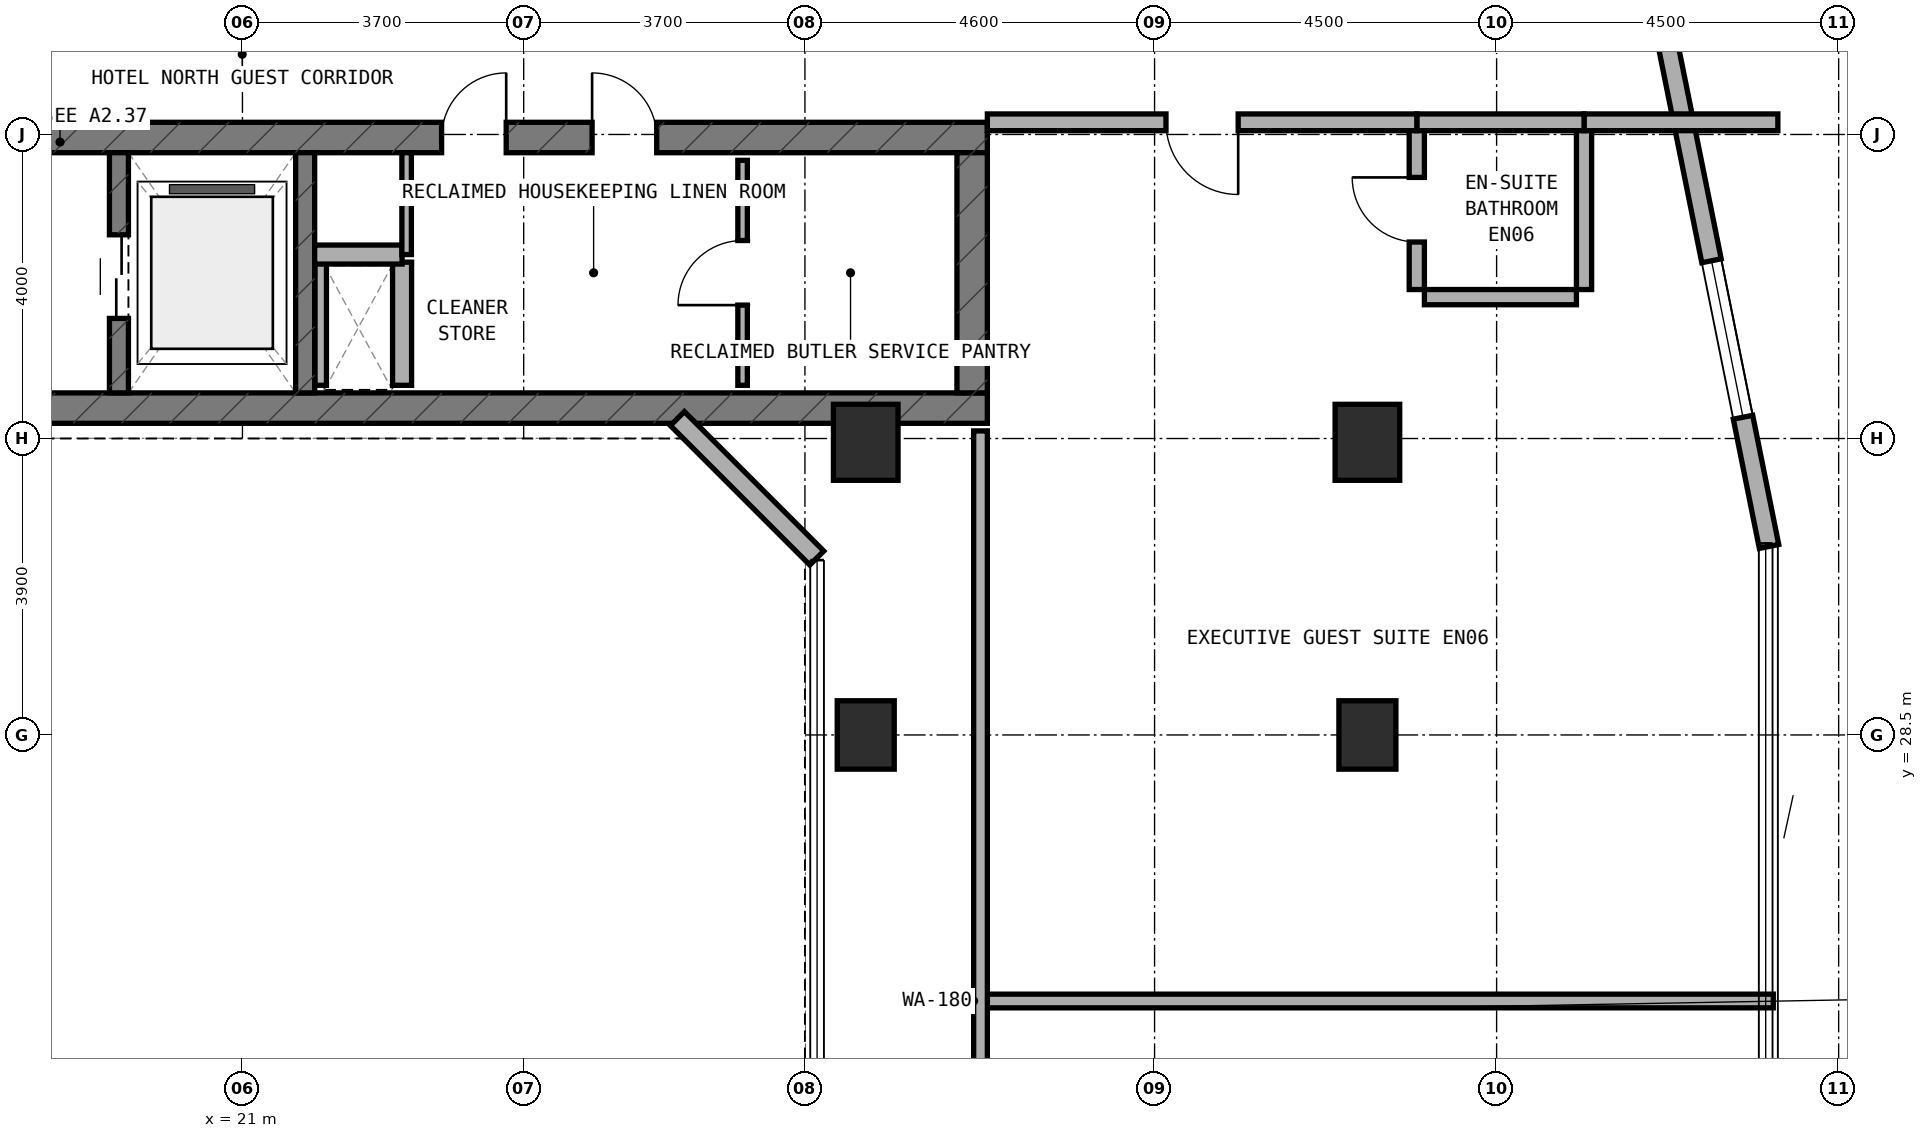
"""IFC4 building model, lengths in metres.
Left out: names, types, materials, properties, quantities, classifications, styles, units other than length and angle.
Written with IfcOpenShell. Run it as: python <this file> out.ifc"""

import sys

from ifc_helpers import new_model, si_unit, direction, frame, frame_2d, origin, origin_2d, place, context, subcontext, project, spatial, rectangle, extrude, element, fill, save


model = new_model("IFC4")
c1 = context("Model", 3, precision=1e-05, world=origin(), true_north=direction((0.0, 1.0)))
c2 = subcontext(c1, "Body", "Model", "MODEL_VIEW")
j1 = project(units=[si_unit("LENGTHUNIT", "METRE"), si_unit("PLANEANGLEUNIT", "RADIAN")], contexts=[c1])
p1 = place(None, origin())
s1 = spatial("IfcSite", under=j1, at=p1, CompositionType="ELEMENT")
p2 = place(p1, origin())
s2 = spatial("IfcBuilding", under=s1, at=p2, CompositionType="ELEMENT")
p3 = place(p2, frame((0.0, 0.0, 166.0)))
s3 = spatial("IfcBuildingStorey", under=s2, at=p3, CompositionType="ELEMENT", Elevation=166.0)
p4 = place(p3, frame((6.4, 32.8, 0.0), z_axis=(0.0, 0.0, 1.0), x_axis=(1.0, 0.0, 0.0)))
e1 = element("IfcWall", 1, at=p4, inside=s3, PredefinedType="SHEAR", context=c2, shape_type="SweptSolid", body=[
    extrude(rectangle(XDim=24.4, YDim=0.4, at=frame_2d((12.2, 0.0))), origin(), (0.0, 0.0, 1.0), 3.5),
])
p5 = place(p4, frame((6.05, 0.0, 0.0)))
e2 = element("IfcOpeningElement", 2, at=p5, cuts=e1, PredefinedType="OPENING", context=c2, shape_type="SweptSolid", body=[
    extrude(rectangle(XDim=1.1, YDim=2.15, at=frame_2d((0.55, 1.075))), frame((0.0, 0.21, 0.0), z_axis=(0.0, -1.0, 0.0), x_axis=(1.0, 0.0, 0.0)), (0.0, 0.0, 1.0), 0.42),
])
p6 = place(p3, frame((6.4, 36.36, 0.0), z_axis=(0.0, 0.0, 1.0), x_axis=(1.0, 0.0, 0.0)))
e3 = element("IfcWall", 3, at=p6, inside=s3, PredefinedType="SHEAR", context=c2, shape_type="SweptSolid", body=[
    extrude(rectangle(XDim=24.4, YDim=0.4, at=frame_2d((12.2, 0.0))), origin(), (0.0, 0.0, 1.0), 3.5),
])
p7 = place(p6, frame((9.15, 0.0, 0.0)))
e4 = element("IfcOpeningElement", 4, at=p7, cuts=e3, PredefinedType="OPENING", context=c2, shape_type="SweptSolid", body=[
    extrude(rectangle(XDim=1.2, YDim=2.15, at=frame_2d((0.6, 1.075))), frame((0.0, 0.21, 0.0), z_axis=(0.0, -1.0, 0.0), x_axis=(1.0, 0.0, 0.0)), (0.0, 0.0, 1.0), 0.42),
])
p8 = place(p6, frame((19.2, 0.0, 0.0)))
e5 = element("IfcOpeningElement", 5, at=p8, cuts=e3, PredefinedType="OPENING", context=c2, shape_type="SweptSolid", body=[
    extrude(rectangle(XDim=0.85, YDim=2.1, at=frame_2d((0.425, 1.05))), frame((0.0, 0.21, 0.0), z_axis=(0.0, -1.0, 0.0), x_axis=(1.0, 0.0, 0.0)), (0.0, 0.0, 1.0), 0.42),
])
p9 = place(p6, frame((17.22, 0.0, 0.0)))
e6 = element("IfcOpeningElement", 6, at=p9, cuts=e3, PredefinedType="OPENING", context=c2, shape_type="SweptSolid", body=[
    extrude(rectangle(XDim=0.85, YDim=2.1, at=frame_2d((0.425, 1.05))), frame((0.0, 0.21, 0.0), z_axis=(0.0, -1.0, 0.0), x_axis=(1.0, 0.0, 0.0)), (0.0, 0.0, 1.0), 0.42),
])
p10 = place(p3, frame((30.6, 33.0, 0.0), z_axis=(0.0, 0.0, 1.0), x_axis=(0.0, 1.0, 0.0)))
e7 = element("IfcWall", 7, at=p10, inside=s3, PredefinedType="SHEAR", context=c2, shape_type="SweptSolid", body=[
    extrude(rectangle(XDim=3.16, YDim=0.4, at=frame_2d((1.58, 0.0))), origin(), (0.0, 0.0, 1.0), 3.5),
])
p11 = place(p3, frame((19.375, 33.0, 0.0), z_axis=(0.0, 0.0, 1.0), x_axis=(0.0, 1.0, 0.0)))
e8 = element("IfcWall", 8, at=p11, inside=s3, PredefinedType="STANDARD", context=c2, shape_type="SweptSolid", body=[
    extrude(rectangle(XDim=3.16, YDim=0.25, at=frame_2d((1.58, 0.0))), origin(), (0.0, 0.0, 1.0), 3.22),
])
p12 = place(p11, frame((0.98, 0.0, 0.0)))
e9 = element("IfcOpeningElement", 9, at=p12, cuts=e8, PredefinedType="OPENING", context=c2, shape_type="SweptSolid", body=[
    extrude(rectangle(XDim=1.1, YDim=2.15, at=frame_2d((0.55, 1.075))), frame((0.0, 0.135, 0.0), z_axis=(0.0, -1.0, 0.0), x_axis=(1.0, 0.0, 0.0)), (0.0, 0.0, 1.0), 0.27),
])
p13 = place(p3, frame((21.825, 33.0, 0.0), z_axis=(0.0, 0.0, 1.0), x_axis=(0.0, 1.0, 0.0)))
e10 = element("IfcWall", 10, at=p13, inside=s3, PredefinedType="STANDARD", context=c2, shape_type="SweptSolid", body=[
    extrude(rectangle(XDim=3.16, YDim=0.25, at=frame_2d((1.58, 0.0))), origin(), (0.0, 0.0, 1.0), 3.22),
])
p14 = place(p3, frame((35.8, 28.5, 0.0), z_axis=(0.0, 0.0, 1.0), x_axis=(1.0, 0.0, 0.0)))
e11 = element("IfcColumn", 11, at=p14, inside=s3, PredefinedType="COLUMN", context=c2, shape_type="SweptSolid", body=[
    extrude(rectangle(XDim=0.75, YDim=0.9, at=origin_2d()), origin(), (0.0, 0.0, 1.0), 3.5),
])
for number, where, z_axis, x_axis in (
    (12, (35.8, 32.35, 0.0), (0.0, 0.0, 1.0), (1.0, 0.0, 0.0)),
    (13, (29.2, 32.35, 0.0), (0.0, 0.0, 1.0), (1.0, 0.0, 0.0)),
):
    element("IfcColumn", number, at=place(p3, frame(where, z_axis=z_axis, x_axis=x_axis)), inside=s3, PredefinedType="COLUMN", context=c2, shape_type="SweptSolid", body=[
        extrude(rectangle(XDim=0.85, YDim=1.0, at=origin_2d()), origin(), (0.0, 0.0, 1.0), 3.5),
    ])
p15 = place(p3, frame((29.2, 28.5, 0.0), z_axis=(0.0, 0.0, 1.0), x_axis=(1.0, 0.0, 0.0)))
e14 = element("IfcColumn", 14, at=p15, inside=s3, PredefinedType="COLUMN", context=c2, shape_type="SweptSolid", body=[
    extrude(rectangle(XDim=0.75, YDim=0.9, at=origin_2d()), origin(), (0.0, 0.0, 1.0), 3.5),
])
p16 = place(p3, frame((41.084, 30.98, 0.0), z_axis=(0.0, 0.0, 1.0), x_axis=(-0.197435082048, 0.980315963543, 0.0)))
e15 = element("IfcWall", 15, at=p16, inside=s3, PredefinedType="STANDARD", context=c2, shape_type="SweptSolid", body=[
    extrude(rectangle(XDim=9.183, YDim=0.26, at=frame_2d((4.591, 0.0))), origin(), (0.0, 0.0, 1.0), 3.22),
])
p17 = place(p16, frame((1.734, 0.0, 0.85)))
e16 = element("IfcOpeningElement", 16, at=p17, cuts=e15, PredefinedType="OPENING", context=c2, shape_type="SweptSolid", body=[
    extrude(rectangle(XDim=2.1, YDim=1.5, at=frame_2d((1.05, 0.75))), frame((0.0, 0.14, 0.0), z_axis=(0.0, -1.0, 0.0), x_axis=(1.0, 0.0, 0.0)), (0.0, 0.0, 1.0), 0.28),
])
p18 = place(p3, frame((28.556, 30.828, 0.0), z_axis=(0.0, 0.0, 1.0), x_axis=(-0.707059717605, 0.707153841636, 0.0)))
e17 = element("IfcWall", 17, at=p18, inside=s3, PredefinedType="STANDARD", context=c2, shape_type="SweptSolid", body=[
    extrude(rectangle(XDim=2.594, YDim=0.26, at=frame_2d((1.297, 0.0))), origin(), (0.0, 0.0, 1.0), 3.22),
])
p19 = place(p3, frame((27.58, 33.1, 0.0), z_axis=(0.0, 0.0, 1.0), x_axis=(0.0, 1.0, 0.0)))
e18 = element("IfcWall", 18, at=p19, inside=s3, PredefinedType="PARTITIONING", context=c2, shape_type="SweptSolid", body=[
    extrude(rectangle(XDim=2.96, YDim=0.125, at=frame_2d((1.48, 0.0))), origin(), (0.0, 0.0, 1.0), 2.795),
])
p20 = place(p19, frame((1.055, 0.0, 0.0)))
e19 = element("IfcOpeningElement", 19, at=p20, cuts=e18, PredefinedType="OPENING", context=c2, shape_type="SweptSolid", body=[
    extrude(rectangle(XDim=0.85, YDim=2.1, at=frame_2d((0.425, 1.05))), frame((0.0, 0.073, 0.0), z_axis=(0.0, -1.0, 0.0), x_axis=(1.0, 0.0, 0.0)), (0.0, 0.0, 1.0), 0.145),
])
p21 = place(p3, frame((22.03, 33.1, 0.0), z_axis=(0.0, 0.0, 1.0), x_axis=(0.0, 1.0, 0.0)))
e20 = element("IfcWall", 20, at=p21, inside=s3, PredefinedType="PARTITIONING", context=c2, shape_type="SweptSolid", body=[
    extrude(rectangle(XDim=1.62, YDim=0.15, at=frame_2d((0.81, 0.0))), origin(), (0.0, 0.0, 1.0), 3.22),
])
p22 = place(p3, frame((23.1, 33.1, 0.0), z_axis=(0.0, 0.0, 1.0), x_axis=(0.0, 1.0, 0.0)))
e21 = element("IfcWall", 21, at=p22, inside=s3, PredefinedType="SOLIDWALL", context=c2, shape_type="SweptSolid", body=[
    extrude(rectangle(XDim=1.62, YDim=0.25, at=frame_2d((0.81, 0.0))), origin(), (0.0, 0.0, 1.0), 3.22),
])
p23 = place(p3, frame((21.95, 34.82, 0.0), z_axis=(0.0, 0.0, 1.0), x_axis=(1.0, 0.0, 0.0)))
e22 = element("IfcWall", 22, at=p23, inside=s3, PredefinedType="SOLIDWALL", context=c2, shape_type="SweptSolid", body=[
    extrude(rectangle(XDim=1.15, YDim=0.25, at=frame_2d((0.575, 0.0))), origin(), (0.0, 0.0, 1.0), 3.22),
])
p24 = place(p3, frame((23.16, 34.82, 0.0), z_axis=(0.0, 0.0, 1.0), x_axis=(0.0, 1.0, 0.0)))
e23 = element("IfcWall", 23, at=p24, inside=s3, PredefinedType="PARTITIONING", context=c2, shape_type="SweptSolid", body=[
    extrude(rectangle(XDim=1.34, YDim=0.125, at=frame_2d((0.67, 0.0))), origin(), (0.0, 0.0, 1.0), 3.22),
])
p25 = place(p3, frame((30.8, 25.0, 0.0), z_axis=(0.0, 0.0, 1.0), x_axis=(1.0, 0.0, 0.0)))
e24 = element("IfcWall", 24, at=p25, inside=s3, PredefinedType="SOLIDWALL", context=c2, shape_type="SweptSolid", body=[
    extrude(rectangle(XDim=10.34, YDim=0.18, at=frame_2d((5.17, 0.0))), origin(), (0.0, 0.0, 1.0), 2.835),
])
p26 = place(p3, frame((30.71, 17.5, 0.0), z_axis=(0.0, 0.0, 1.0), x_axis=(0.0, 1.0, 0.0)))
e25 = element("IfcWall", 25, at=p26, inside=s3, PredefinedType="SOLIDWALL", context=c2, shape_type="SweptSolid", body=[
    extrude(rectangle(XDim=15.0, YDim=0.18, at=frame_2d((7.5, 0.0))), origin(), (0.0, 0.0, 1.0), 2.795),
])
p27 = place(p3, frame((36.45, 34.36, 0.0), z_axis=(0.0, 0.0, 1.0), x_axis=(0.0, 1.0, 0.0)))
e26 = element("IfcWall", 26, at=p27, inside=s3, PredefinedType="PLUMBINGWALL", context=c2, shape_type="SweptSolid", body=[
    extrude(rectangle(XDim=2.1, YDim=0.2, at=frame_2d((1.05, 0.0))), origin(), (0.0, 0.0, 1.0), 3.22),
])
p28 = place(p27, frame((0.625, 0.0, 0.0)))
e27 = element("IfcOpeningElement", 27, at=p28, cuts=e26, PredefinedType="OPENING", context=c2, shape_type="SweptSolid", body=[
    extrude(rectangle(XDim=0.85, YDim=2.1, at=frame_2d((0.425, 1.05))), frame((0.0, 0.11, 0.0), z_axis=(0.0, -1.0, 0.0), x_axis=(1.0, 0.0, 0.0)), (0.0, 0.0, 1.0), 0.22),
])
p29 = place(p3, frame((36.55, 34.26, 0.0), z_axis=(0.0, 0.0, 1.0), x_axis=(1.0, 0.0, 0.0)))
e28 = element("IfcWall", 28, at=p29, inside=s3, PredefinedType="PLUMBINGWALL", context=c2, shape_type="SweptSolid", body=[
    extrude(rectangle(XDim=2.0, YDim=0.2, at=frame_2d((1.0, 0.0))), origin(), (0.0, 0.0, 1.0), 3.22),
])
p30 = place(p3, frame((38.65, 34.36, 0.0), z_axis=(0.0, 0.0, 1.0), x_axis=(0.0, 1.0, 0.0)))
e29 = element("IfcWall", 29, at=p30, inside=s3, PredefinedType="PLUMBINGWALL", context=c2, shape_type="SweptSolid", body=[
    extrude(rectangle(XDim=2.1, YDim=0.2, at=frame_2d((1.05, 0.0))), origin(), (0.0, 0.0, 1.0), 3.22),
])
p31 = place(p3, frame((38.65, 36.56, 0.0), z_axis=(0.0, 0.0, 1.0), x_axis=(1.0, 0.0, 0.0)))
e30 = element("IfcWall", 30, at=p31, inside=s3, PredefinedType="SOLIDWALL", context=c2, shape_type="SweptSolid", body=[
    extrude(rectangle(XDim=2.55, YDim=0.22, at=frame_2d((1.275, 0.0))), origin(), (0.0, 0.0, 1.0), 3.22),
])
p32 = place(p3, frame((36.45, 36.56, 0.0), z_axis=(0.0, 0.0, 1.0), x_axis=(1.0, 0.0, 0.0)))
e31 = element("IfcWall", 31, at=p32, inside=s3, PredefinedType="SOLIDWALL", context=c2, shape_type="SweptSolid", body=[
    extrude(rectangle(XDim=2.2, YDim=0.22, at=frame_2d((1.1, 0.0))), origin(), (0.0, 0.0, 1.0), 3.22),
])
p33 = place(p3, frame((30.8, 36.56, 0.0), z_axis=(0.0, 0.0, 1.0), x_axis=(1.0, 0.0, 0.0)))
e32 = element("IfcWall", 32, at=p33, inside=s3, PredefinedType="SOLIDWALL", context=c2, shape_type="SweptSolid", body=[
    extrude(rectangle(XDim=5.65, YDim=0.22, at=frame_2d((2.825, 0.0))), origin(), (0.0, 0.0, 1.0), 2.795),
])
p34 = place(p33, frame((2.35, 0.0, 0.0)))
e33 = element("IfcOpeningElement", 33, at=p34, cuts=e32, PredefinedType="OPENING", context=c2, shape_type="SweptSolid", body=[
    extrude(rectangle(XDim=0.95, YDim=2.1, at=frame_2d((0.475, 1.05))), frame((0.0, 0.12, 0.0), z_axis=(0.0, -1.0, 0.0), x_axis=(1.0, 0.0, 0.0)), (0.0, 0.0, 1.0), 0.24),
])
p35 = place(p17, origin())
e34 = element("IfcWindow", 34, at=p35, inside=s3, PartitioningType="SINGLE_PANEL", PredefinedType="WINDOW", context=c2, shape_type="SweptSolid", body=[
    extrude(rectangle(XDim=2.1, YDim=1.5, at=frame_2d((1.05, 0.75))), frame((0.0, 0.03, 0.0), z_axis=(0.0, -1.0, 0.0), x_axis=(1.0, 0.0, 0.0)), (0.0, 0.0, 1.0), 0.06),
])
fill(e16, e34)
p36 = place(p12, origin())
e35 = element("IfcDoor", 35, at=p36, inside=s3, OperationType="DOUBLE_DOOR_SLIDING", PredefinedType="DOOR", context=c2, shape_type="SweptSolid", body=[
    extrude(rectangle(XDim=1.1, YDim=2.15, at=frame_2d((0.55, 1.075))), frame((0.0, 0.025, 0.0), z_axis=(0.0, -1.0, 0.0), x_axis=(1.0, 0.0, 0.0)), (0.0, 0.0, 1.0), 0.05),
])
fill(e9, e35)
p37 = place(p8, origin())
e36 = element("IfcDoor", 36, at=p37, inside=s3, OperationType="SINGLE_SWING_LEFT", PredefinedType="DOOR", context=c2, shape_type="SweptSolid", body=[
    extrude(rectangle(XDim=0.85, YDim=2.1, at=frame_2d((0.425, 1.05))), frame((0.0, 0.025, 0.0), z_axis=(0.0, -1.0, 0.0), x_axis=(1.0, 0.0, 0.0)), (0.0, 0.0, 1.0), 0.05),
])
fill(e5, e36)
p38 = place(p9, origin())
e37 = element("IfcDoor", 37, at=p38, inside=s3, OperationType="SINGLE_SWING_RIGHT", PredefinedType="DOOR", context=c2, shape_type="SweptSolid", body=[
    extrude(rectangle(XDim=0.85, YDim=2.1, at=frame_2d((0.425, 1.05))), frame((0.0, 0.025, 0.0), z_axis=(0.0, -1.0, 0.0), x_axis=(1.0, 0.0, 0.0)), (0.0, 0.0, 1.0), 0.05),
])
fill(e6, e37)
p39 = place(p20, origin())
e38 = element("IfcDoor", 38, at=p39, inside=s3, OperationType="SINGLE_SWING_LEFT", PredefinedType="DOOR", context=c2, shape_type="SweptSolid", body=[
    extrude(rectangle(XDim=0.85, YDim=2.1, at=frame_2d((0.425, 1.05))), frame((0.0, 0.025, 0.0), z_axis=(0.0, -1.0, 0.0), x_axis=(1.0, 0.0, 0.0)), (0.0, 0.0, 1.0), 0.05),
])
fill(e19, e38)
p40 = place(p28, origin())
e39 = element("IfcDoor", 39, at=p40, inside=s3, OperationType="SINGLE_SWING_RIGHT", PredefinedType="DOOR", context=c2, shape_type="SweptSolid", body=[
    extrude(rectangle(XDim=0.85, YDim=2.1, at=frame_2d((0.425, 1.05))), frame((0.0, 0.025, 0.0), z_axis=(0.0, -1.0, 0.0), x_axis=(1.0, 0.0, 0.0)), (0.0, 0.0, 1.0), 0.05),
])
fill(e27, e39)
p41 = place(p34, frame((0.95, 0.0, 0.0), z_axis=(0.0, 0.0, 1.0), x_axis=(-1.0, 0.0, 0.0)))
e40 = element("IfcDoor", 40, at=p41, inside=s3, OperationType="SINGLE_SWING_LEFT", PredefinedType="DOOR", context=c2, shape_type="SweptSolid", body=[
    extrude(rectangle(XDim=0.95, YDim=2.1, at=frame_2d((0.475, 1.05))), frame((0.0, 0.025, 0.0), z_axis=(0.0, -1.0, 0.0), x_axis=(1.0, 0.0, 0.0)), (0.0, 0.0, 1.0), 0.05),
])
fill(e33, e40)
save(model, sys.argv[1])
